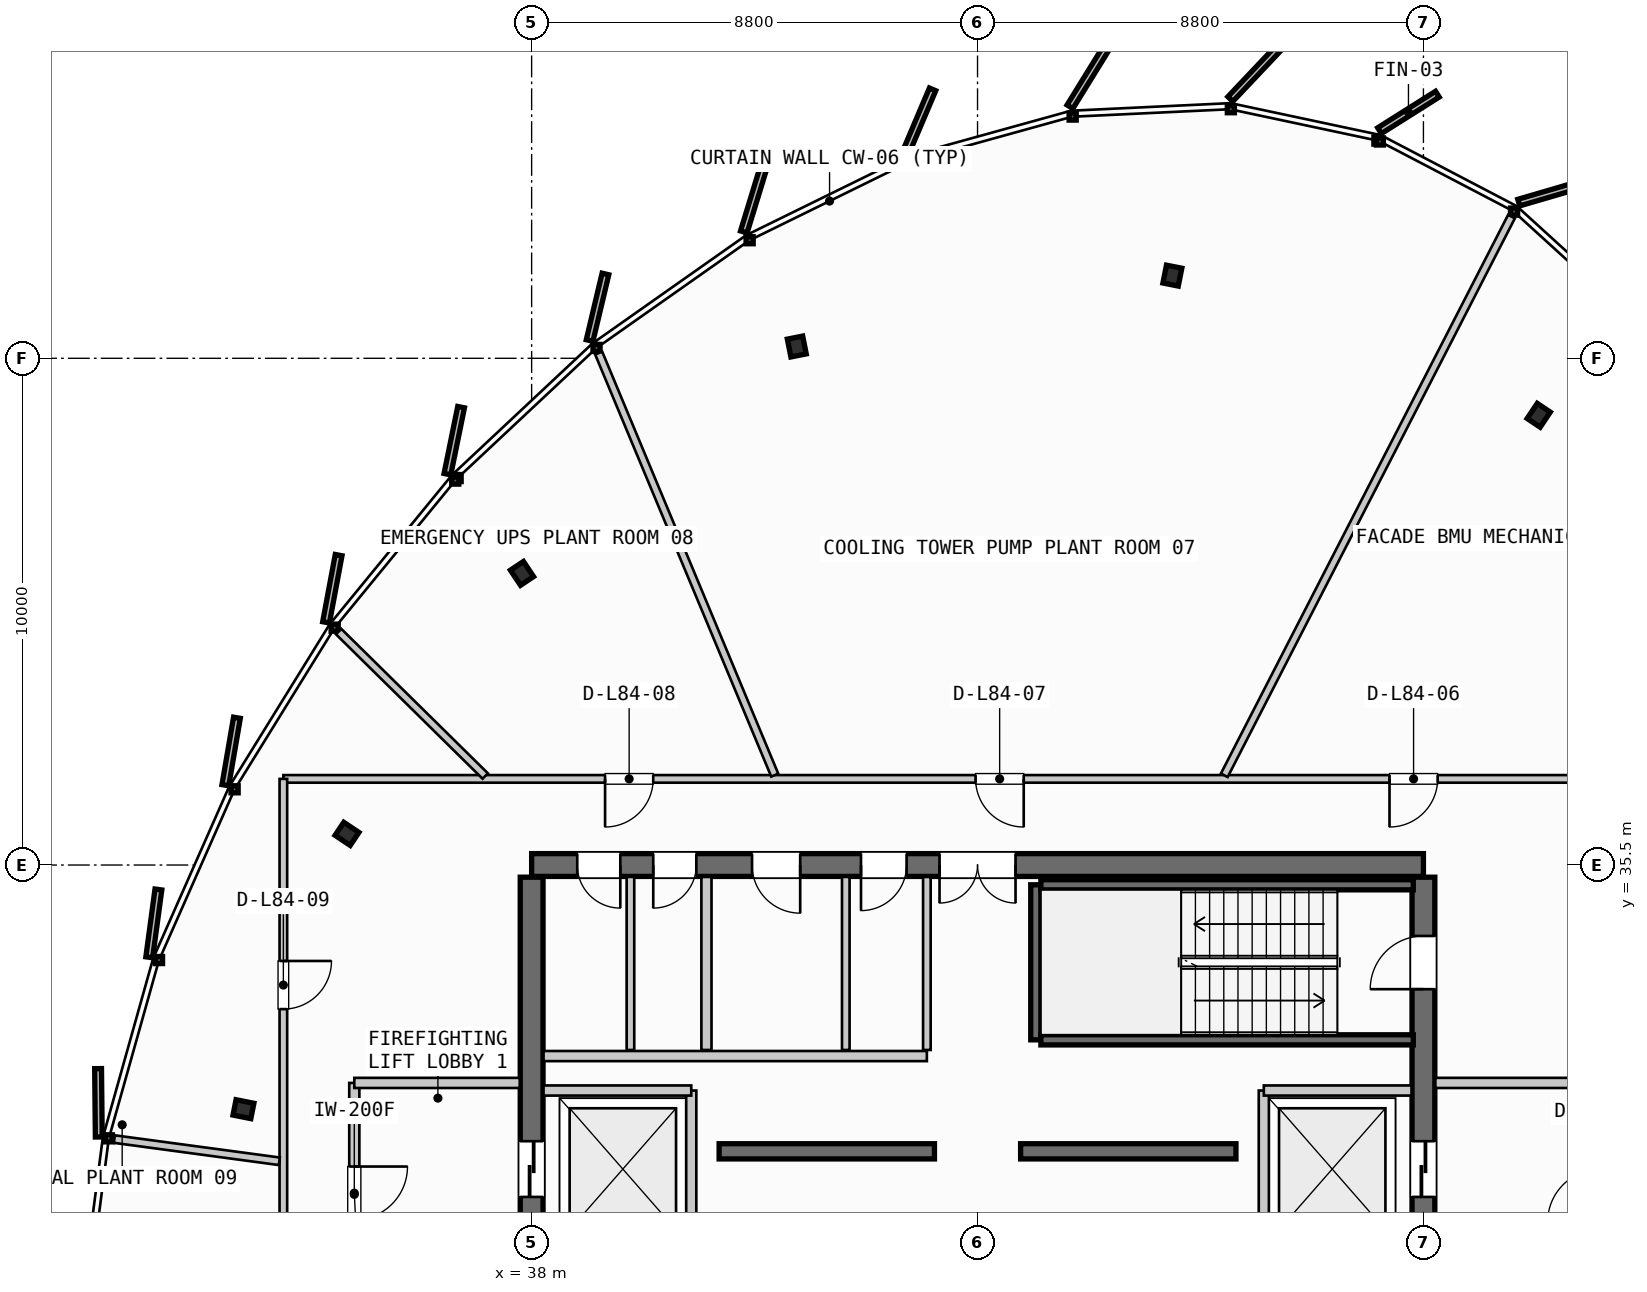
"""IFC4 building model, lengths in metres.
Left out: names, types, materials, properties, quantities, classifications, styles, units other than length and angle.
Written with IfcOpenShell. Run it as: python <this file> out.ifc"""

import sys

from ifc_helpers import new_model, si_unit, direction, frame, frame_2d, origin, origin_2d, place, context, subcontext, project, spatial, rectangle, i_section, extrude, source, transform, mapped, element, fill, save


model = new_model("IFC4")
c1 = context("Model", 3, precision=1e-05, world=origin(), true_north=direction((0.0, 1.0)))
c2 = subcontext(c1, "Body", "Model", "MODEL_VIEW")
j1 = project(units=[si_unit("LENGTHUNIT", "METRE"), si_unit("PLANEANGLEUNIT", "RADIAN")], contexts=[c1])
p1 = place(None, origin())
s1 = spatial("IfcSite", under=j1, at=p1, CompositionType="ELEMENT")
p2 = place(p1, origin())
s2 = spatial("IfcBuilding", under=s1, at=p2, CompositionType="ELEMENT")
p3 = place(p2, frame((0.0, 0.0, 316.3)))
s3 = spatial("IfcBuildingStorey", under=s2, at=p3, CompositionType="ELEMENT", Elevation=316.3)
p4 = place(p3, frame((55.6, 35.5, 0.0), z_axis=(0.0, 0.0, 1.0), x_axis=(-1.0, 0.0, 0.0)))
e1 = element("IfcWall", 1, at=p4, inside=s3, PredefinedType="SHEAR", context=c2, shape_type="SweptSolid", body=[
    extrude(rectangle(XDim=17.6, YDim=0.45, at=frame_2d((8.8, 0.0))), origin(), (0.0, 0.0, 1.0), 3.735),
])
p5 = place(p4, frame((8.05, 0.0, 0.0)))
e2 = element("IfcOpeningElement", 2, at=p5, cuts=e1, PredefinedType="OPENING", context=c2, shape_type="SweptSolid", body=[
    extrude(rectangle(XDim=1.5, YDim=2.2, at=frame_2d((0.75, 1.1))), frame((0.0, 0.235, 0.0), z_axis=(0.0, -1.0, 0.0), x_axis=(1.0, 0.0, 0.0)), (0.0, 0.0, 1.0), 0.47),
])
p6 = place(p4, frame((15.85, 0.0, 0.0)))
e3 = element("IfcOpeningElement", 3, at=p6, cuts=e1, PredefinedType="OPENING", context=c2, shape_type="SweptSolid", body=[
    extrude(rectangle(XDim=0.85, YDim=2.15, at=frame_2d((0.425, 1.075))), frame((0.0, 0.235, 0.0), z_axis=(0.0, -1.0, 0.0), x_axis=(1.0, 0.0, 0.0)), (0.0, 0.0, 1.0), 0.47),
])
p7 = place(p4, frame((14.35, 0.0, 0.0)))
e4 = element("IfcOpeningElement", 4, at=p7, cuts=e1, PredefinedType="OPENING", context=c2, shape_type="SweptSolid", body=[
    extrude(rectangle(XDim=0.85, YDim=2.15, at=frame_2d((0.425, 1.075))), frame((0.0, 0.235, 0.0), z_axis=(0.0, -1.0, 0.0), x_axis=(1.0, 0.0, 0.0)), (0.0, 0.0, 1.0), 0.47),
])
p8 = place(p4, frame((12.3, 0.0, 0.0)))
e5 = element("IfcOpeningElement", 5, at=p8, cuts=e1, PredefinedType="OPENING", context=c2, shape_type="SweptSolid", body=[
    extrude(rectangle(XDim=0.95, YDim=2.15, at=frame_2d((0.475, 1.075))), frame((0.0, 0.235, 0.0), z_axis=(0.0, -1.0, 0.0), x_axis=(1.0, 0.0, 0.0)), (0.0, 0.0, 1.0), 0.47),
])
p9 = place(p4, frame((10.2, 0.0, 0.0)))
e6 = element("IfcOpeningElement", 6, at=p9, cuts=e1, PredefinedType="OPENING", context=c2, shape_type="SweptSolid", body=[
    extrude(rectangle(XDim=0.9, YDim=2.15, at=frame_2d((0.45, 1.075))), frame((0.0, 0.235, 0.0), z_axis=(0.0, -1.0, 0.0), x_axis=(1.0, 0.0, 0.0)), (0.0, 0.0, 1.0), 0.47),
])
p10 = place(p3, frame((38.0, 35.26, 0.0), z_axis=(0.0, 0.0, 1.0), x_axis=(0.0, -1.0, 0.0)))
e7 = element("IfcWall", 7, at=p10, inside=s3, PredefinedType="SHEAR", context=c2, shape_type="SweptSolid", body=[
    extrude(rectangle(XDim=14.92, YDim=0.45, at=frame_2d((7.46, 0.0))), origin(), (0.0, 0.0, 1.0), 3.735),
])
p11 = place(p10, frame((5.21, 0.0, 0.0)))
e8 = element("IfcOpeningElement", 8, at=p11, cuts=e7, PredefinedType="OPENING", context=c2, shape_type="SweptSolid", body=[
    extrude(rectangle(XDim=1.1, YDim=2.2, at=frame_2d((0.55, 1.1))), frame((0.0, 0.235, 0.0), z_axis=(0.0, -1.0, 0.0), x_axis=(1.0, 0.0, 0.0)), (0.0, 0.0, 1.0), 0.47),
])
p12 = place(p3, frame((55.6, 20.34, 0.0), z_axis=(0.0, 0.0, 1.0), x_axis=(0.0, 1.0, 0.0)))
e9 = element("IfcWall", 9, at=p12, inside=s3, PredefinedType="SHEAR", context=c2, shape_type="SweptSolid", body=[
    extrude(rectangle(XDim=14.92, YDim=0.45, at=frame_2d((7.46, 0.0))), origin(), (0.0, 0.0, 1.0), 3.735),
])
p13 = place(p12, frame((12.71, 0.0, 0.0)))
e10 = element("IfcOpeningElement", 10, at=p13, cuts=e9, PredefinedType="OPENING", context=c2, shape_type="SweptSolid", body=[
    extrude(rectangle(XDim=1.05, YDim=2.15, at=frame_2d((0.525, 1.075))), frame((0.0, 0.235, 0.0), z_axis=(0.0, -1.0, 0.0), x_axis=(1.0, 0.0, 0.0)), (0.0, 0.0, 1.0), 0.47),
])
p14 = place(p12, frame((8.61, 0.0, 0.0)))
e11 = element("IfcOpeningElement", 11, at=p14, cuts=e9, PredefinedType="OPENING", context=c2, shape_type="SweptSolid", body=[
    extrude(rectangle(XDim=1.1, YDim=2.2, at=frame_2d((0.55, 1.1))), frame((0.0, 0.235, 0.0), z_axis=(0.0, -1.0, 0.0), x_axis=(1.0, 0.0, 0.0)), (0.0, 0.0, 1.0), 0.47),
])
for number, where, z_axis, x_axis in (
    (12, (41.7, 29.85, 0.0), (0.0, 0.0, 1.0), (1.0, 0.0, 0.0)),
    (13, (47.65, 29.85, 0.0), (0.0, 0.0, 1.0), (1.0, 0.0, 0.0)),
):
    element("IfcWall", number, at=place(p3, frame(where, z_axis=z_axis, x_axis=x_axis)), inside=s3, PredefinedType="SHEAR", context=c2, shape_type="SweptSolid", body=[
        extrude(rectangle(XDim=4.25, YDim=0.3, at=frame_2d((2.125, 0.0))), origin(), (0.0, 0.0, 1.0), 3.735),
    ])
m1 = source(origin(), c2, "Body", "SweptSolid", [
    extrude(i_section(OverallWidth=0.309, OverallDepth=0.359, WebThickness=0.016, FlangeThickness=0.026, FilletRadius=0.027, at=origin_2d()), origin(), (0.0, 0.0, 1.0), 3.735),
])
for number, where, z_axis, x_axis in (
    (14, (57.875, 44.375, 0.0), (0.0, 0.0, 1.0), (0.556, 0.831, 0.0)),
    (15, (50.645, 47.132, 0.0), (0.0, 0.0, 1.0), (0.195, 0.981, 0.0)),
    (16, (43.233, 45.732, 0.0), (0.0, 0.0, 1.0), (-0.195, 0.981, 0.0)),
    (17, (37.81, 41.255, 0.0), (0.0, 0.0, 1.0), (-0.556, 0.831, 0.0)),
    (18, (34.356, 36.115, 0.0), (0.0, 0.0, 1.0), (-0.831, 0.556, 0.0)),
    (19, (32.312, 30.682, 0.0), (0.0, 0.0, 1.0), (-0.981, 0.195, 0.0)),
):
    element("IfcColumn", number, at=place(p3, frame(where, z_axis=z_axis, x_axis=x_axis)), inside=s3, PredefinedType="COLUMN", context=c2, shape_type="MappedRepresentation", body=[
        mapped(m1, transform((0.0, 0.0, 0.0), scale=1.0)),
    ])
p15 = place(p3, frame((47.95, 32.05, 0.0), z_axis=(0.0, 0.0, 1.0), x_axis=(0.0, 1.0, 0.0)))
e20 = element("IfcWall", 20, at=p15, inside=s3, PredefinedType="SHEAR", context=c2, shape_type="SweptSolid", body=[
    extrude(rectangle(XDim=3.06, YDim=0.2, at=frame_2d((1.53, 0.0))), origin(), (0.0, 0.0, 1.0), 3.735),
])
for number, where, z_axis, x_axis in (
    (21, (48.05, 35.11, 0.0), (0.0, 0.0, 1.0), (1.0, 0.0, 0.0)),
    (22, (55.4, 32.05, 0.0), (0.0, 0.0, 1.0), (-1.0, 0.0, 0.0)),
):
    element("IfcWall", number, at=place(p3, frame(where, z_axis=z_axis, x_axis=x_axis)), inside=s3, PredefinedType="SHEAR", context=c2, shape_type="SweptSolid", body=[
        extrude(rectangle(XDim=7.35, YDim=0.2, at=frame_2d((3.675, 0.0))), origin(), (0.0, 0.0, 1.0), 3.735),
    ])
p16 = place(p3, frame((41.15, 27.95, 0.0), z_axis=(0.0, 0.0, 1.0), x_axis=(0.0, 1.0, 0.0)))
e23 = element("IfcWall", 23, at=p16, inside=s3, PredefinedType="PARTITIONING", context=c2, shape_type="SweptSolid", body=[
    extrude(rectangle(XDim=3.1, YDim=0.2, at=frame_2d((1.55, 0.0))), origin(), (0.0, 0.0, 1.0), 3.26),
])
p17 = place(p3, frame((38.235, 31.05, 0.0), z_axis=(0.0, 0.0, 1.0), x_axis=(1.0, 0.0, 0.0)))
e24 = element("IfcWall", 24, at=p17, inside=s3, PredefinedType="PARTITIONING", context=c2, shape_type="SweptSolid", body=[
    extrude(rectangle(XDim=2.915, YDim=0.2, at=frame_2d((1.458, 0.0))), origin(), (0.0, 0.0, 1.0), 3.26),
])
p18 = place(p3, frame((34.5, 31.2, 0.0), z_axis=(0.0, 0.0, 1.0), x_axis=(0.0, -1.0, 0.0)))
e25 = element("IfcWall", 25, at=p18, inside=s3, PredefinedType="PARTITIONING", context=c2, shape_type="SweptSolid", body=[
    extrude(rectangle(XDim=4.4, YDim=0.2, at=frame_2d((2.2, 0.0))), origin(), (0.0, 0.0, 1.0), 3.26),
])
p19 = place(p18, frame((1.65, 0.0, 0.0)))
e26 = element("IfcOpeningElement", 26, at=p19, cuts=e25, PredefinedType="OPENING", context=c2, shape_type="SweptSolid", body=[
    extrude(rectangle(XDim=1.05, YDim=2.15, at=frame_2d((0.525, 1.075))), frame((0.0, 0.11, 0.0), z_axis=(0.0, -1.0, 0.0), x_axis=(1.0, 0.0, 0.0)), (0.0, 0.0, 1.0), 0.22),
])
p20 = place(p3, frame((34.5, 31.2, 0.0), z_axis=(0.0, 0.0, 1.0), x_axis=(1.0, 0.0, 0.0)))
e27 = element("IfcWall", 27, at=p20, inside=s3, PredefinedType="PARTITIONING", context=c2, shape_type="SweptSolid", body=[
    extrude(rectangle(XDim=3.265, YDim=0.2, at=frame_2d((1.632, 0.0))), origin(), (0.0, 0.0, 1.0), 3.26),
])
p21 = place(p3, frame((52.45, 27.95, 0.0), z_axis=(0.0, 0.0, 1.0), x_axis=(0.0, 1.0, 0.0)))
e28 = element("IfcWall", 28, at=p21, inside=s3, PredefinedType="PARTITIONING", context=c2, shape_type="SweptSolid", body=[
    extrude(rectangle(XDim=3.1, YDim=0.2, at=frame_2d((1.55, 0.0))), origin(), (0.0, 0.0, 1.0), 3.26),
])
p22 = place(p3, frame((52.45, 31.05, 0.0), z_axis=(0.0, 0.0, 1.0), x_axis=(1.0, 0.0, 0.0)))
e29 = element("IfcWall", 29, at=p22, inside=s3, PredefinedType="PARTITIONING", context=c2, shape_type="SweptSolid", body=[
    extrude(rectangle(XDim=2.915, YDim=0.2, at=frame_2d((1.458, 0.0))), origin(), (0.0, 0.0, 1.0), 3.26),
])
p23 = place(p3, frame((55.835, 31.2, 0.0), z_axis=(0.0, 0.0, 1.0), x_axis=(1.0, 0.0, 0.0)))
e30 = element("IfcWall", 30, at=p23, inside=s3, PredefinedType="PARTITIONING", context=c2, shape_type="SweptSolid", body=[
    extrude(rectangle(XDim=3.265, YDim=0.2, at=frame_2d((1.633, 0.0))), origin(), (0.0, 0.0, 1.0), 3.26),
])
p24 = place(p3, frame((41.45, 31.85, 0.0), z_axis=(0.0, 0.0, 1.0), x_axis=(0.0, 1.0, 0.0)))
e31 = element("IfcWall", 31, at=p24, inside=s3, PredefinedType="PARTITIONING", context=c2, shape_type="SweptSolid", body=[
    extrude(rectangle(XDim=3.415, YDim=0.2, at=frame_2d((1.708, 0.0))), origin(), (0.0, 0.0, 1.0), 3.26),
])
p25 = place(p3, frame((38.235, 31.73, 0.0), z_axis=(0.0, 0.0, 1.0), x_axis=(1.0, 0.0, 0.0)))
e32 = element("IfcWall", 32, at=p25, inside=s3, PredefinedType="PARTITIONING", context=c2, shape_type="SweptSolid", body=[
    extrude(rectangle(XDim=7.565, YDim=0.2, at=frame_2d((3.782, 0.0))), origin(), (0.0, 0.0, 1.0), 3.26),
])
for number, where, z_axis, x_axis in (
    (33, (45.8, 31.85, 0.0), (0.0, 0.0, 1.0), (0.0, 1.0, 0.0)),
    (34, (39.95, 31.85, 0.0), (0.0, 0.0, 1.0), (0.0, 1.0, 0.0)),
):
    element("IfcWall", number, at=place(p3, frame(where, z_axis=z_axis, x_axis=x_axis)), inside=s3, PredefinedType="PARTITIONING", context=c2, shape_type="SweptSolid", body=[
        extrude(rectangle(XDim=3.415, YDim=0.15, at=frame_2d((1.708, 0.0))), origin(), (0.0, 0.0, 1.0), 3.26),
    ])
p26 = place(p3, frame((44.2, 31.85, 0.0), z_axis=(0.0, 0.0, 1.0), x_axis=(0.0, 1.0, 0.0)))
e35 = element("IfcWall", 35, at=p26, inside=s3, PredefinedType="PLUMBINGWALL", context=c2, shape_type="SweptSolid", body=[
    extrude(rectangle(XDim=3.415, YDim=0.15, at=frame_2d((1.708, 0.0))), origin(), (0.0, 0.0, 1.0), 3.26),
])
p27 = place(p3, frame((60.5, 37.2, 0.0), z_axis=(0.0, 0.0, 1.0), x_axis=(-1.0, 0.0, 0.0)))
e36 = element("IfcWall", 36, at=p27, inside=s3, PredefinedType="PARTITIONING", context=c2, shape_type="SweptSolid", body=[
    extrude(rectangle(XDim=27.4, YDim=0.15, at=frame_2d((13.7, 0.0))), origin(), (0.0, 0.0, 1.0), 3.26),
])
p28 = place(p27, frame((4.619, 0.0, 0.0)))
e37 = element("IfcOpeningElement", 37, at=p28, cuts=e36, PredefinedType="OPENING", context=c2, shape_type="SweptSolid", body=[
    extrude(rectangle(XDim=0.95, YDim=2.15, at=frame_2d((0.475, 1.075))), frame((0.0, 0.085, 0.0), z_axis=(0.0, -1.0, 0.0), x_axis=(1.0, 0.0, 0.0)), (0.0, 0.0, 1.0), 0.17),
])
p29 = place(p27, frame((12.789, 0.0, 0.0)))
e38 = element("IfcOpeningElement", 38, at=p29, cuts=e36, PredefinedType="OPENING", context=c2, shape_type="SweptSolid", body=[
    extrude(rectangle(XDim=0.95, YDim=2.15, at=frame_2d((0.475, 1.075))), frame((0.0, 0.085, 0.0), z_axis=(0.0, -1.0, 0.0), x_axis=(1.0, 0.0, 0.0)), (0.0, 0.0, 1.0), 0.17),
])
p30 = place(p27, frame((20.101, 0.0, 0.0)))
e39 = element("IfcOpeningElement", 39, at=p30, cuts=e36, PredefinedType="OPENING", context=c2, shape_type="SweptSolid", body=[
    extrude(rectangle(XDim=0.95, YDim=2.15, at=frame_2d((0.475, 1.075))), frame((0.0, 0.085, 0.0), z_axis=(0.0, -1.0, 0.0), x_axis=(1.0, 0.0, 0.0)), (0.0, 0.0, 1.0), 0.17),
])
p31 = place(p3, frame((33.1, 37.2, 0.0), z_axis=(0.0, 0.0, 1.0), x_axis=(0.0, -1.0, 0.0)))
e40 = element("IfcWall", 40, at=p31, inside=s3, PredefinedType="PARTITIONING", context=c2, shape_type="SweptSolid", body=[
    extrude(rectangle(XDim=18.8, YDim=0.15, at=frame_2d((9.4, 0.0))), origin(), (0.0, 0.0, 1.0), 3.26),
])
p32 = place(p31, frame((3.594, 0.0, 0.0)))
e41 = element("IfcOpeningElement", 41, at=p32, cuts=e40, PredefinedType="OPENING", context=c2, shape_type="SweptSolid", body=[
    extrude(rectangle(XDim=0.95, YDim=2.15, at=frame_2d((0.475, 1.075))), frame((0.0, 0.085, 0.0), z_axis=(0.0, -1.0, 0.0), x_axis=(1.0, 0.0, 0.0)), (0.0, 0.0, 1.0), 0.17),
])
p33 = place(p31, frame((10.939, 0.0, 0.0)))
e42 = element("IfcOpeningElement", 42, at=p33, cuts=e40, PredefinedType="OPENING", context=c2, shape_type="SweptSolid", body=[
    extrude(rectangle(XDim=0.95, YDim=2.15, at=frame_2d((0.475, 1.075))), frame((0.0, 0.085, 0.0), z_axis=(0.0, -1.0, 0.0), x_axis=(1.0, 0.0, 0.0)), (0.0, 0.0, 1.0), 0.17),
])
p34 = place(p3, frame((51.67, 37.271, 0.0), z_axis=(0.0, 0.0, 1.0), x_axis=(0.457212742862, 0.889357356615, 0.0)))
e43 = element("IfcWall", 43, at=p34, inside=s3, PredefinedType="PARTITIONING", context=c2, shape_type="SweptSolid", body=[
    extrude(rectangle(XDim=12.398, YDim=0.15, at=frame_2d((6.199, 0.0))), origin(), (0.0, 0.0, 1.0), 3.26),
])
p35 = place(p3, frame((42.798, 37.274, 0.0), z_axis=(0.0, 0.0, 1.0), x_axis=(-0.385020636299, 0.922907963788, 0.0)))
e44 = element("IfcWall", 44, at=p35, inside=s3, PredefinedType="PARTITIONING", context=c2, shape_type="SweptSolid", body=[
    extrude(rectangle(XDim=9.025, YDim=0.15, at=frame_2d((4.513, 0.0))), origin(), (0.0, 0.0, 1.0), 3.26),
])
p36 = place(p3, frame((37.084, 37.256, 0.0), z_axis=(0.0, 0.0, 1.0), x_axis=(-0.712347608645, 0.701826819421, 0.0)))
e45 = element("IfcWall", 45, at=p36, inside=s3, PredefinedType="PARTITIONING", context=c2, shape_type="SweptSolid", body=[
    extrude(rectangle(XDim=4.061, YDim=0.15, at=frame_2d((2.031, 0.0))), origin(), (0.0, 0.0, 1.0), 3.26),
])
p37 = place(p3, frame((33.021, 29.654, 0.0), z_axis=(0.0, 0.0, 1.0), x_axis=(-0.99106425122, 0.133385343851, 0.0)))
e46 = element("IfcWall", 46, at=p37, inside=s3, PredefinedType="PARTITIONING", context=c2, shape_type="SweptSolid", body=[
    extrude(rectangle(XDim=3.285, YDim=0.15, at=frame_2d((1.643, 0.0))), origin(), (0.0, 0.0, 1.0), 3.26),
])
m2 = source(origin(), c2, "Body", "SweptSolid", [
    extrude(rectangle(XDim=1.05, YDim=2.15, at=frame_2d((0.525, 1.075))), frame((0.0, 0.025, 0.0), z_axis=(0.0, -1.0, 0.0), x_axis=(1.0, 0.0, 0.0)), (0.0, 0.0, 1.0), 0.05),
])
p38 = place(p13, origin())
e47 = element("IfcDoor", 47, at=p38, inside=s3, OperationType="SINGLE_SWING_LEFT", PredefinedType="DOOR", context=c2, shape_type="MappedRepresentation", body=[
    mapped(m2, transform((0.0, 0.0, 0.0), scale=1.0)),
])
fill(e10, e47)
m3 = source(origin(), c2, "Body", "SweptSolid", [
    extrude(rectangle(XDim=1.5, YDim=2.2, at=frame_2d((0.75, 1.1))), frame((0.0, 0.025, 0.0), z_axis=(0.0, -1.0, 0.0), x_axis=(1.0, 0.0, 0.0)), (0.0, 0.0, 1.0), 0.05),
])
p39 = place(p5, origin())
e48 = element("IfcDoor", 48, at=p39, inside=s3, OperationType="DOUBLE_DOOR_SINGLE_SWING", PredefinedType="DOOR", context=c2, shape_type="MappedRepresentation", body=[
    mapped(m3, transform((0.0, 0.0, 0.0), scale=1.0)),
])
fill(e2, e48)
m4 = source(origin(), c2, "Body", "SweptSolid", [
    extrude(rectangle(XDim=1.1, YDim=2.2, at=frame_2d((0.55, 1.1))), frame((0.0, 0.025, 0.0), z_axis=(0.0, -1.0, 0.0), x_axis=(1.0, 0.0, 0.0)), (0.0, 0.0, 1.0), 0.05),
])
p40 = place(p11, origin())
e49 = element("IfcDoor", 49, at=p40, inside=s3, OperationType="SLIDING_TO_LEFT", PredefinedType="DOOR", context=c2, shape_type="MappedRepresentation", body=[
    mapped(m4, transform((0.0, 0.0, 0.0), scale=1.0)),
])
fill(e8, e49)
p41 = place(p14, origin())
e50 = element("IfcDoor", 50, at=p41, inside=s3, OperationType="SLIDING_TO_RIGHT", PredefinedType="DOOR", context=c2, shape_type="MappedRepresentation", body=[
    mapped(m4, transform((0.0, 0.0, 0.0), scale=1.0)),
])
fill(e11, e50)
m5 = source(origin(), c2, "Body", "SweptSolid", [
    extrude(rectangle(XDim=0.85, YDim=2.15, at=frame_2d((0.425, 1.075))), frame((0.0, 0.025, 0.0), z_axis=(0.0, -1.0, 0.0), x_axis=(1.0, 0.0, 0.0)), (0.0, 0.0, 1.0), 0.05),
])
p42 = place(p6, origin())
e51 = element("IfcDoor", 51, at=p42, inside=s3, OperationType="SINGLE_SWING_LEFT", PredefinedType="DOOR", context=c2, shape_type="MappedRepresentation", body=[
    mapped(m5, transform((0.0, 0.0, 0.0), scale=1.0)),
])
fill(e3, e51)
p43 = place(p7, origin())
e52 = element("IfcDoor", 52, at=p43, inside=s3, OperationType="SINGLE_SWING_RIGHT", PredefinedType="DOOR", context=c2, shape_type="MappedRepresentation", body=[
    mapped(m5, transform((0.0, 0.0, 0.0), scale=1.0)),
])
fill(e4, e52)
m6 = source(origin(), c2, "Body", "SweptSolid", [
    extrude(rectangle(XDim=0.95, YDim=2.15, at=frame_2d((0.475, 1.075))), frame((0.0, 0.025, 0.0), z_axis=(0.0, -1.0, 0.0), x_axis=(1.0, 0.0, 0.0)), (0.0, 0.0, 1.0), 0.05),
])
p44 = place(p8, origin())
e53 = element("IfcDoor", 53, at=p44, inside=s3, OperationType="SINGLE_SWING_LEFT", PredefinedType="DOOR", context=c2, shape_type="MappedRepresentation", body=[
    mapped(m6, transform((0.0, 0.0, 0.0), scale=1.0)),
])
fill(e5, e53)
m7 = source(origin(), c2, "Body", "SweptSolid", [
    extrude(rectangle(XDim=0.9, YDim=2.15, at=frame_2d((0.45, 1.075))), frame((0.0, 0.025, 0.0), z_axis=(0.0, -1.0, 0.0), x_axis=(1.0, 0.0, 0.0)), (0.0, 0.0, 1.0), 0.05),
])
p45 = place(p9, origin())
e54 = element("IfcDoor", 54, at=p45, inside=s3, OperationType="SINGLE_SWING_RIGHT", PredefinedType="DOOR", context=c2, shape_type="MappedRepresentation", body=[
    mapped(m7, transform((0.0, 0.0, 0.0), scale=1.0)),
])
fill(e6, e54)
p46 = place(p19, origin())
e55 = element("IfcDoor", 55, at=p46, inside=s3, OperationType="SINGLE_SWING_LEFT", PredefinedType="DOOR", context=c2, shape_type="MappedRepresentation", body=[
    mapped(m2, transform((0.0, 0.0, 0.0), scale=1.0)),
])
fill(e26, e55)
p47 = place(p28, origin())
e56 = element("IfcDoor", 56, at=p47, inside=s3, OperationType="SINGLE_SWING_RIGHT", PredefinedType="DOOR", context=c2, shape_type="MappedRepresentation", body=[
    mapped(m6, transform((0.0, 0.0, 0.0), scale=1.0)),
])
fill(e37, e56)
p48 = place(p29, origin())
e57 = element("IfcDoor", 57, at=p48, inside=s3, OperationType="SINGLE_SWING_LEFT", PredefinedType="DOOR", context=c2, shape_type="MappedRepresentation", body=[
    mapped(m6, transform((0.0, 0.0, 0.0), scale=1.0)),
])
fill(e38, e57)
p49 = place(p30, origin())
e58 = element("IfcDoor", 58, at=p49, inside=s3, OperationType="SINGLE_SWING_RIGHT", PredefinedType="DOOR", context=c2, shape_type="MappedRepresentation", body=[
    mapped(m6, transform((0.0, 0.0, 0.0), scale=1.0)),
])
fill(e39, e58)
p50 = place(p32, origin())
e59 = element("IfcDoor", 59, at=p50, inside=s3, OperationType="SINGLE_SWING_LEFT", PredefinedType="DOOR", context=c2, shape_type="MappedRepresentation", body=[
    mapped(m6, transform((0.0, 0.0, 0.0), scale=1.0)),
])
fill(e41, e59)
save(model, sys.argv[1])
